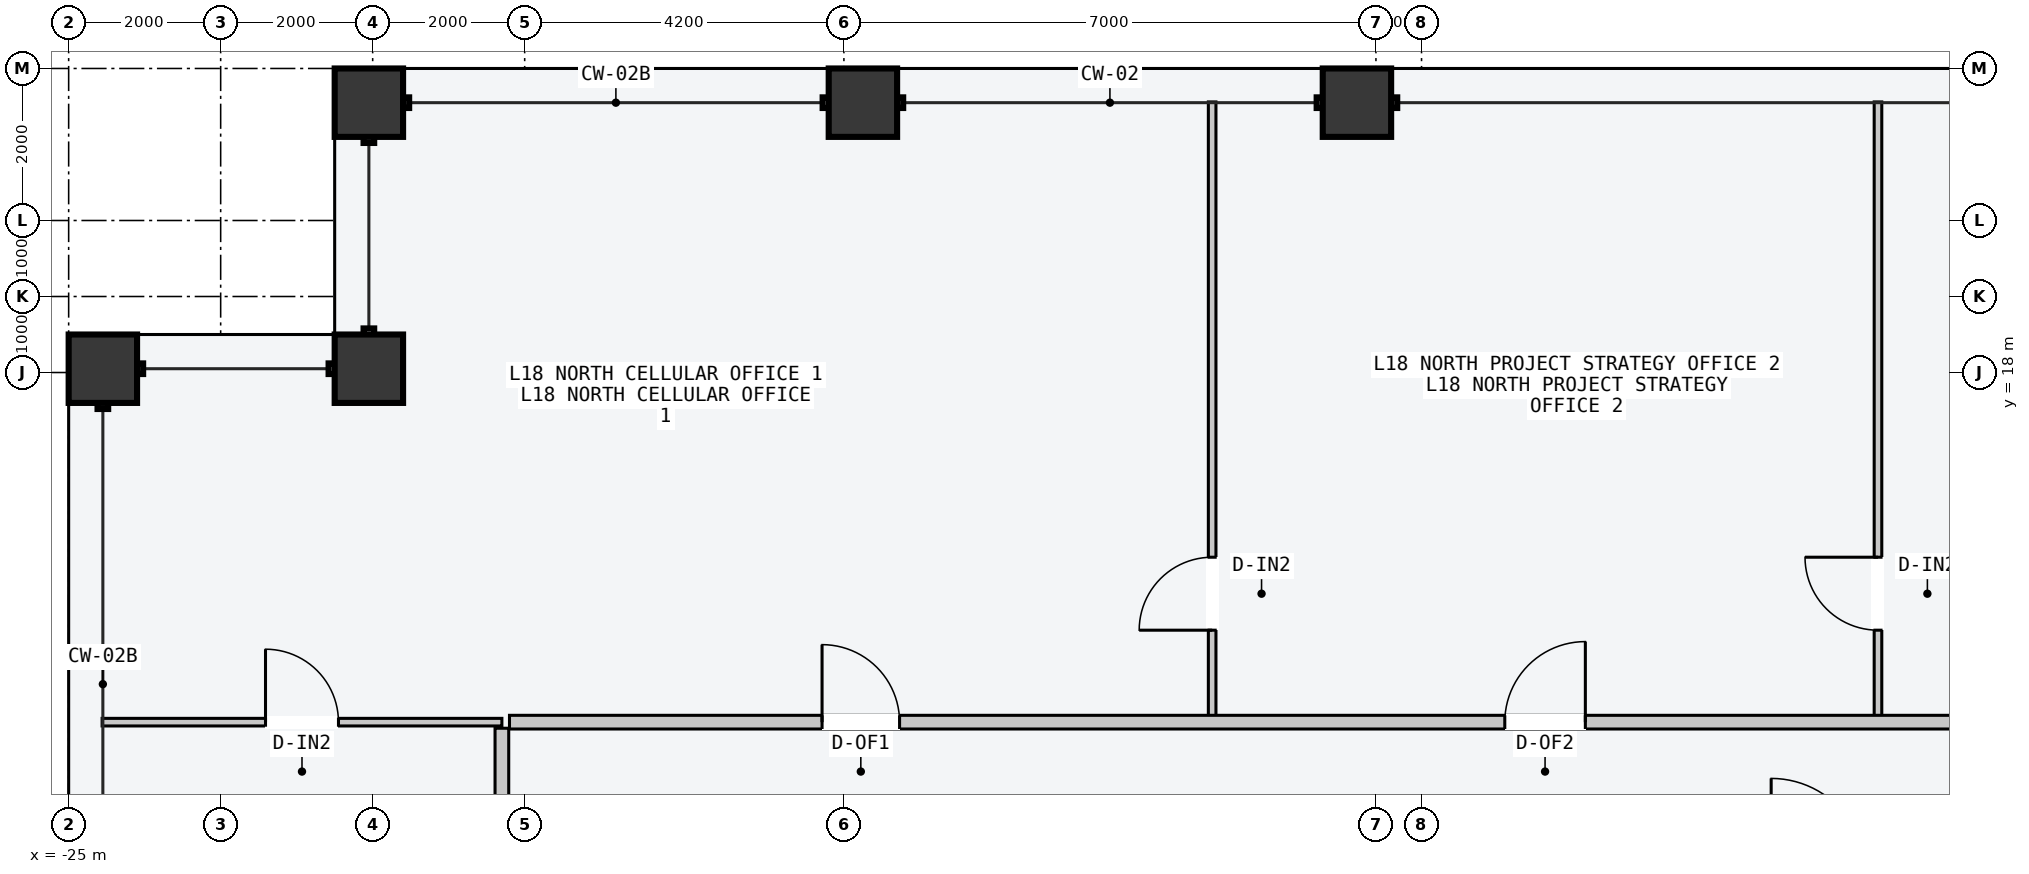
"""IFC4 building model, lengths in metres.
Left out: names, types, materials, properties, quantities, classifications, styles, units other than length and angle.
Written with IfcOpenShell. Run it as: python <this file> out.ifc"""

import sys

from ifc_helpers import new_model, si_unit, direction, frame, frame_2d, origin, origin_2d, place, context, subcontext, project, spatial, rectangle, hollow_rectangle, extrude, element, fill, save


model = new_model("IFC4")
c1 = context("Model", 3, precision=1e-05, world=origin(), true_north=direction((0.0, 1.0)))
c2 = subcontext(c1, "Body", "Model", "MODEL_VIEW")
j1 = project(units=[si_unit("LENGTHUNIT", "METRE"), si_unit("PLANEANGLEUNIT", "RADIAN")], contexts=[c1])
p1 = place(None, origin())
s1 = spatial("IfcSite", under=j1, at=p1, CompositionType="ELEMENT")
p2 = place(p1, origin())
s2 = spatial("IfcBuilding", under=s1, at=p2, CompositionType="ELEMENT")
p3 = place(p2, frame((0.0, 0.0, 70.8)))
s3 = spatial("IfcBuildingStorey", under=s2, at=p3, CompositionType="ELEMENT", Elevation=70.8)
for number, where, z_axis, x_axis in (
    (1, (-21.05, 21.55, 0.0), (0.0, 0.0, 1.0), (1.0, 0.0, 0.0)),
    (2, (-14.55, 21.55, 0.0), (0.0, 0.0, 1.0), (1.0, 0.0, 0.0)),
    (3, (-8.05, 21.55, 0.0), (0.0, 0.0, 1.0), (1.0, 0.0, 0.0)),
    (4, (-24.55, 18.05, 0.0), (0.0, 0.0, 1.0), (0.0, 1.0, 0.0)),
    (5, (-21.05, 18.05, 0.0), (0.0, 0.0, 1.0), (1.0, 0.0, 0.0)),
):
    element("IfcColumn", number, at=place(p3, frame(where, z_axis=z_axis, x_axis=x_axis)), inside=s3, PredefinedType="COLUMN", context=c2, shape_type="SweptSolid", body=[
        extrude(hollow_rectangle(XDim=0.9, YDim=0.9, WallThickness=0.045, at=origin_2d()), origin(), (0.0, 0.0, 1.0), 3.6),
    ])
p4 = place(p3, frame((-9.955, 13.46, 0.0), z_axis=(0.0, 0.0, 1.0), x_axis=(0.0, 1.0, 0.0)))
e6 = element("IfcWall", 6, at=p4, inside=s3, PredefinedType="PARTITIONING", context=c2, shape_type="SweptSolid", body=[
    extrude(rectangle(XDim=8.1, YDim=0.1, at=frame_2d((4.05, 0.0))), origin(), (0.0, 0.0, 1.0), 3.4),
])
p5 = place(p4, frame((1.15, 0.0, 0.0)))
e7 = element("IfcOpeningElement", 7, at=p5, cuts=e6, PredefinedType="OPENING", context=c2, shape_type="SweptSolid", body=[
    extrude(rectangle(XDim=0.96, YDim=2.18, at=frame_2d((0.48, 1.09))), frame((0.0, 0.06, 0.0), z_axis=(0.0, -1.0, 0.0), x_axis=(1.0, 0.0, 0.0)), (0.0, 0.0, 1.0), 0.12),
])
p6 = place(p3, frame((-1.195, 13.46, 0.0), z_axis=(0.0, 0.0, 1.0), x_axis=(0.0, 1.0, 0.0)))
e8 = element("IfcWall", 8, at=p6, inside=s3, PredefinedType="PARTITIONING", context=c2, shape_type="SweptSolid", body=[
    extrude(rectangle(XDim=8.1, YDim=0.1, at=frame_2d((4.05, 0.0))), origin(), (0.0, 0.0, 1.0), 3.4),
])
p7 = place(p6, frame((1.15, 0.0, 0.0)))
e9 = element("IfcOpeningElement", 9, at=p7, cuts=e8, PredefinedType="OPENING", context=c2, shape_type="SweptSolid", body=[
    extrude(rectangle(XDim=0.96, YDim=2.18, at=frame_2d((0.48, 1.09))), frame((0.0, 0.06, 0.0), z_axis=(0.0, -1.0, 0.0), x_axis=(1.0, 0.0, 0.0)), (0.0, 0.0, 1.0), 0.12),
])
p8 = place(p3, frame((-19.2, 13.4, 0.0), z_axis=(0.0, 0.0, 1.0), x_axis=(1.0, 0.0, 0.0)))
e10 = element("IfcWall", 10, at=p8, inside=s3, PredefinedType="PARTITIONING", context=c2, shape_type="SweptSolid", body=[
    extrude(rectangle(XDim=38.4, YDim=0.18, at=frame_2d((19.2, 0.0))), origin(), (0.0, 0.0, 1.0), 3.4),
])
p9 = place(p8, frame((4.113, 0.0, 0.0)))
e11 = element("IfcOpeningElement", 11, at=p9, cuts=e10, PredefinedType="OPENING", context=c2, shape_type="SweptSolid", body=[
    extrude(rectangle(XDim=1.02, YDim=2.2, at=frame_2d((0.51, 1.1))), frame((0.0, 0.1, 0.0), z_axis=(0.0, -1.0, 0.0), x_axis=(1.0, 0.0, 0.0)), (0.0, 0.0, 1.0), 0.2),
])
p10 = place(p8, frame((13.095, 0.0, 0.0)))
e12 = element("IfcOpeningElement", 12, at=p10, cuts=e10, PredefinedType="OPENING", context=c2, shape_type="SweptSolid", body=[
    extrude(rectangle(XDim=1.06, YDim=2.2, at=frame_2d((0.53, 1.1))), frame((0.0, 0.1, 0.0), z_axis=(0.0, -1.0, 0.0), x_axis=(1.0, 0.0, 0.0)), (0.0, 0.0, 1.0), 0.2),
])
p11 = place(p8, frame((21.168, 0.0, 0.0)))
e13 = element("IfcOpeningElement", 13, at=p11, cuts=e10, PredefinedType="OPENING", context=c2, shape_type="SweptSolid", body=[
    extrude(rectangle(XDim=1.24, YDim=2.24, at=frame_2d((0.62, 1.12))), frame((0.0, 0.1, 0.0), z_axis=(0.0, -1.0, 0.0), x_axis=(1.0, 0.0, 0.0)), (0.0, 0.0, 1.0), 0.2),
])
p12 = place(p8, frame((28.455, 0.0, 0.0)))
e14 = element("IfcOpeningElement", 14, at=p12, cuts=e10, PredefinedType="OPENING", context=c2, shape_type="SweptSolid", body=[
    extrude(rectangle(XDim=1.4, YDim=2.2, at=frame_2d((0.7, 1.1))), frame((0.0, 0.1, 0.0), z_axis=(0.0, -1.0, 0.0), x_axis=(1.0, 0.0, 0.0)), (0.0, 0.0, 1.0), 0.2),
])
p13 = place(p8, frame((35.119, 0.0, 0.0)))
e15 = element("IfcOpeningElement", 15, at=p13, cuts=e10, PredefinedType="OPENING", context=c2, shape_type="SweptSolid", body=[
    extrude(rectangle(XDim=0.9, YDim=2.15, at=frame_2d((0.45, 1.075))), frame((0.0, 0.1, 0.0), z_axis=(0.0, -1.0, 0.0), x_axis=(1.0, 0.0, 0.0)), (0.0, 0.0, 1.0), 0.2),
])
p14 = place(p3, frame((-24.56, 13.4, 0.0), z_axis=(0.0, 0.0, 1.0), x_axis=(1.0, 0.0, 0.0)))
e16 = element("IfcWall", 16, at=p14, inside=s3, PredefinedType="PARTITIONING", context=c2, shape_type="SweptSolid", body=[
    extrude(rectangle(XDim=5.26, YDim=0.1, at=frame_2d((2.63, 0.0))), origin(), (0.0, 0.0, 1.0), 3.4),
])
p15 = place(p14, frame((2.15, 0.0, 0.0)))
e17 = element("IfcOpeningElement", 17, at=p15, cuts=e16, PredefinedType="OPENING", context=c2, shape_type="SweptSolid", body=[
    extrude(rectangle(XDim=0.96, YDim=2.18, at=frame_2d((0.48, 1.09))), frame((0.0, 0.06, 0.0), z_axis=(0.0, -1.0, 0.0), x_axis=(1.0, 0.0, 0.0)), (0.0, 0.0, 1.0), 0.12),
])
p16 = place(p3, frame((-19.3, -12.12, 0.0), z_axis=(0.0, 0.0, 1.0), x_axis=(0.0, 1.0, 0.0)))
e18 = element("IfcWall", 18, at=p16, inside=s3, PredefinedType="PARTITIONING", context=c2, shape_type="SweptSolid", body=[
    extrude(rectangle(XDim=25.44, YDim=0.18, at=frame_2d((12.72, 0.0))), origin(), (0.0, 0.0, 1.0), 3.4),
])
p17 = place(p16, frame((12.19, 0.0, 0.0)))
e19 = element("IfcOpeningElement", 19, at=p17, cuts=e18, PredefinedType="OPENING", context=c2, shape_type="SweptSolid", body=[
    extrude(rectangle(XDim=1.06, YDim=2.2, at=frame_2d((0.53, 1.1))), frame((0.0, 0.1, 0.0), z_axis=(0.0, -1.0, 0.0), x_axis=(1.0, 0.0, 0.0)), (0.0, 0.0, 1.0), 0.2),
])
p18 = place(p5, origin())
e20 = element("IfcDoor", 20, at=p18, inside=s3, OperationType="SINGLE_SWING_LEFT", PredefinedType="DOOR", context=c2, shape_type="SweptSolid", body=[
    extrude(rectangle(XDim=0.96, YDim=2.18, at=frame_2d((0.48, 1.09))), frame((0.0, 0.025, 0.0), z_axis=(0.0, -1.0, 0.0), x_axis=(1.0, 0.0, 0.0)), (0.0, 0.0, 1.0), 0.05),
])
fill(e7, e20)
p19 = place(p7, origin())
e21 = element("IfcDoor", 21, at=p19, inside=s3, OperationType="SINGLE_SWING_RIGHT", PredefinedType="DOOR", context=c2, shape_type="SweptSolid", body=[
    extrude(rectangle(XDim=0.96, YDim=2.18, at=frame_2d((0.48, 1.09))), frame((0.0, 0.025, 0.0), z_axis=(0.0, -1.0, 0.0), x_axis=(1.0, 0.0, 0.0)), (0.0, 0.0, 1.0), 0.05),
])
fill(e9, e21)
p20 = place(p9, origin())
e22 = element("IfcDoor", 22, at=p20, inside=s3, OperationType="SINGLE_SWING_LEFT", PredefinedType="DOOR", context=c2, shape_type="SweptSolid", body=[
    extrude(rectangle(XDim=1.02, YDim=2.2, at=frame_2d((0.51, 1.1))), frame((0.0, 0.025, 0.0), z_axis=(0.0, -1.0, 0.0), x_axis=(1.0, 0.0, 0.0)), (0.0, 0.0, 1.0), 0.05),
])
fill(e11, e22)
p21 = place(p10, origin())
e23 = element("IfcDoor", 23, at=p21, inside=s3, OperationType="SINGLE_SWING_RIGHT", PredefinedType="DOOR", context=c2, shape_type="SweptSolid", body=[
    extrude(rectangle(XDim=1.06, YDim=2.2, at=frame_2d((0.53, 1.1))), frame((0.0, 0.025, 0.0), z_axis=(0.0, -1.0, 0.0), x_axis=(1.0, 0.0, 0.0)), (0.0, 0.0, 1.0), 0.05),
])
fill(e12, e23)
p22 = place(p15, origin())
e24 = element("IfcDoor", 24, at=p22, inside=s3, OperationType="SINGLE_SWING_LEFT", PredefinedType="DOOR", context=c2, shape_type="SweptSolid", body=[
    extrude(rectangle(XDim=0.96, YDim=2.18, at=frame_2d((0.48, 1.09))), frame((0.0, 0.025, 0.0), z_axis=(0.0, -1.0, 0.0), x_axis=(1.0, 0.0, 0.0)), (0.0, 0.0, 1.0), 0.05),
])
fill(e17, e24)
save(model, sys.argv[1])
